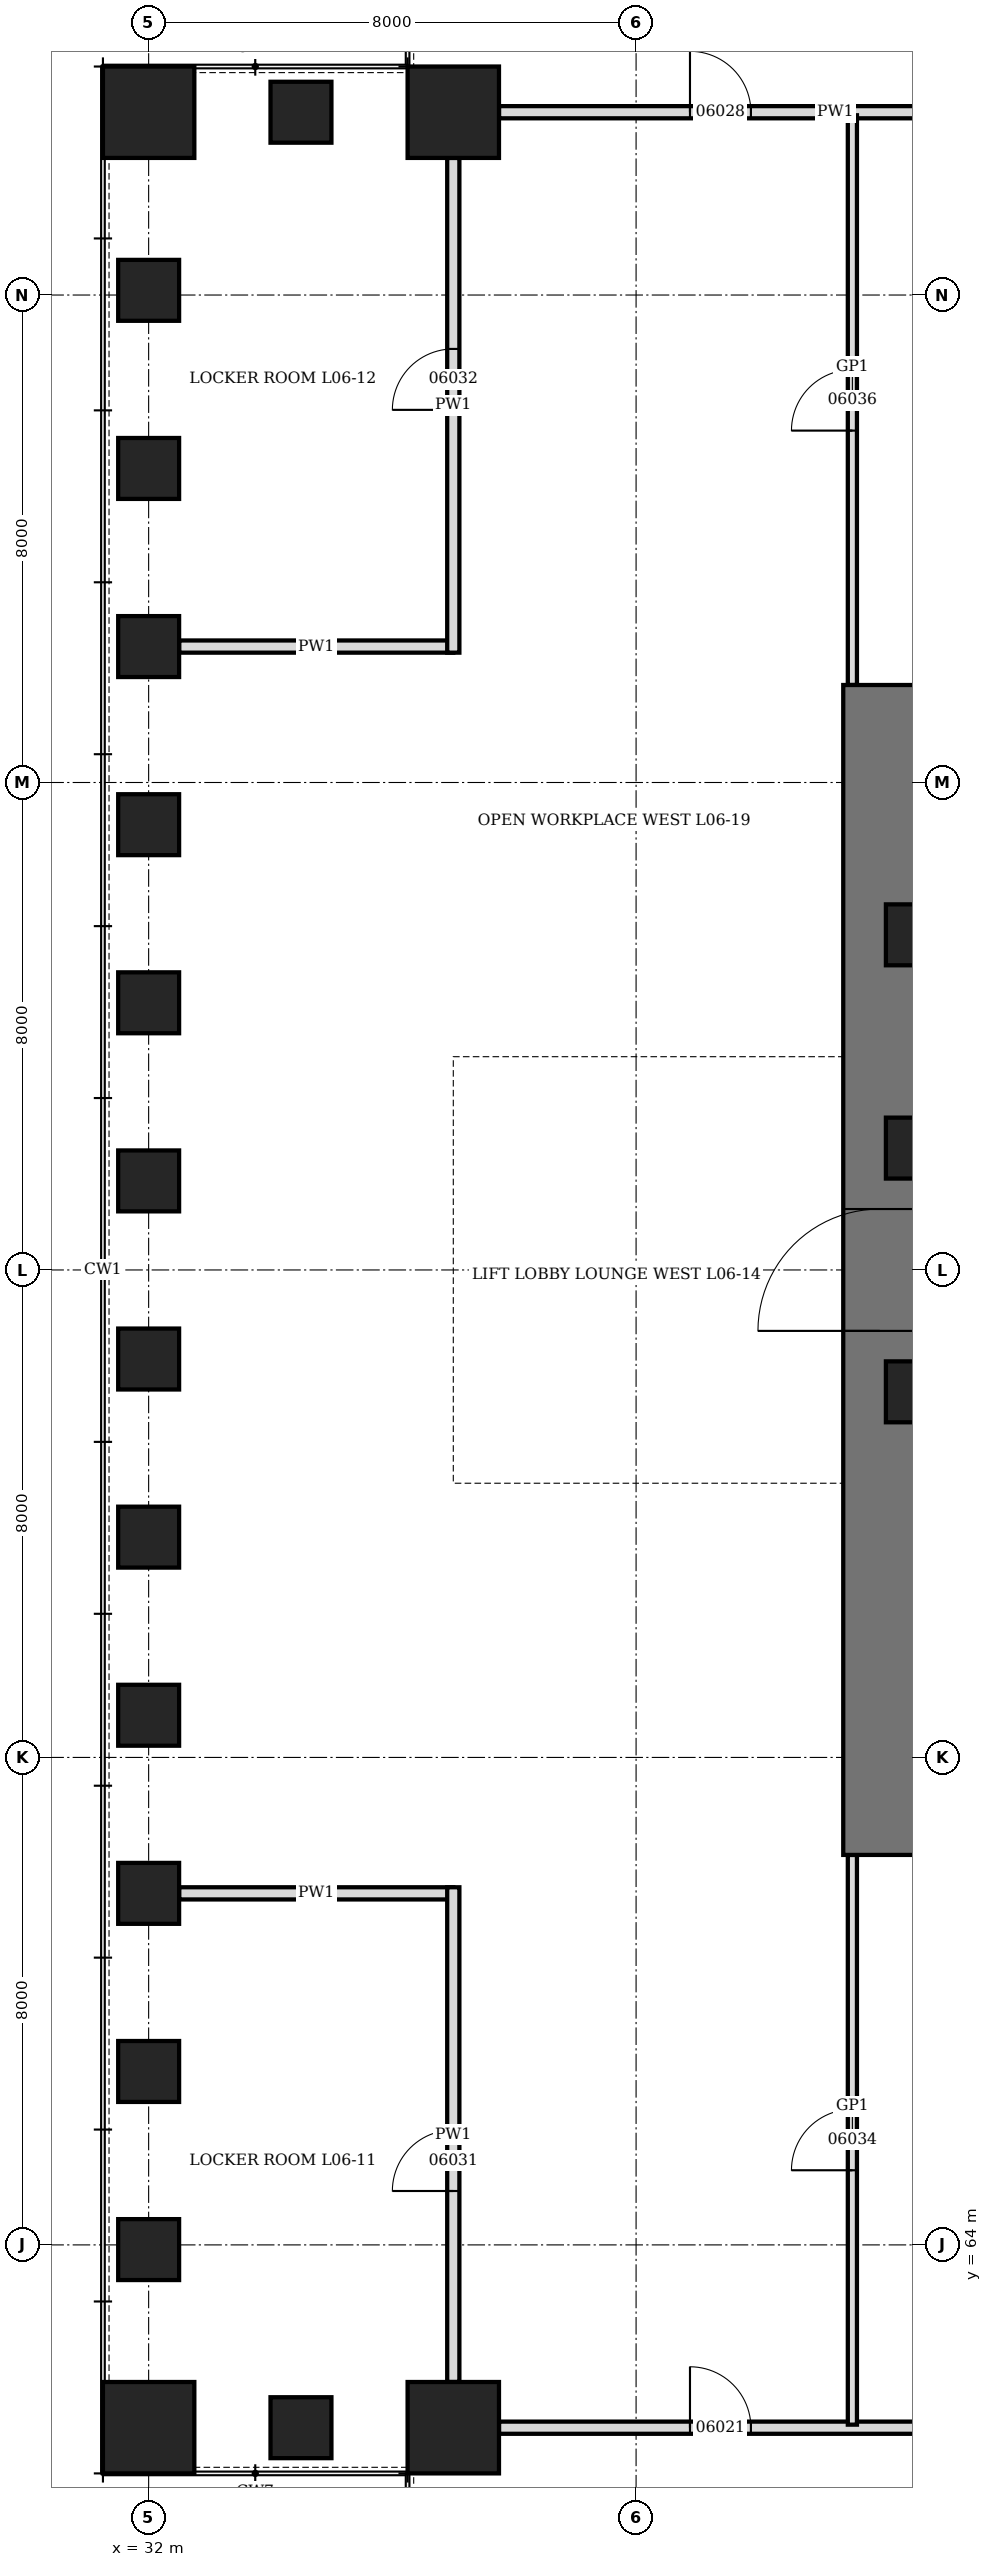
"""IFC4 building model, lengths in metres.
Left out: names, types, materials, properties, quantities, classifications, styles, units other than length and angle.
Written with IfcOpenShell. Run it as: python <this file> out.ifc"""

import sys

from ifc_helpers import new_model, si_unit, direction, frame, frame_2d, origin, origin_2d, place, context, subcontext, project, spatial, rectangle, hollow_rectangle, extrude, element, fill, save


model = new_model("IFC4")
c1 = context("Model", 3, precision=1e-05, world=origin(), true_north=direction((0.0, 1.0)))
c2 = subcontext(c1, "Body", "Model", "MODEL_VIEW")
j1 = project(units=[si_unit("LENGTHUNIT", "METRE"), si_unit("PLANEANGLEUNIT", "RADIAN")], contexts=[c1])
p1 = place(None, origin())
s1 = spatial("IfcSite", under=j1, at=p1, CompositionType="ELEMENT")
p2 = place(p1, origin())
s2 = spatial("IfcBuilding", under=s1, at=p2, CompositionType="ELEMENT")
p3 = place(p2, frame((0.0, 0.0, 34.9)))
s3 = spatial("IfcBuildingStorey", under=s2, at=p3, CompositionType="ELEMENT", Elevation=34.9)
p4 = place(p3, frame((37.0, 99.0, -0.3), z_axis=(0.0, 0.0, 1.0), x_axis=(1.0, 0.0, 0.0)))
e1 = element("IfcColumn", 1, at=p4, inside=s3, PredefinedType="COLUMN", context=c2, shape_type="SweptSolid", body=[
    extrude(hollow_rectangle(XDim=1.5, YDim=1.5, WallThickness=0.6, at=origin_2d()), origin(), (0.0, 0.0, 1.0), 4.5),
])
p5 = place(p3, frame((34.5, 99.0, -0.3), z_axis=(0.0, 0.0, 1.0), x_axis=(1.0, 0.0, 0.0)))
e2 = element("IfcColumn", 2, at=p5, inside=s3, PredefinedType="COLUMN", context=c2, shape_type="SweptSolid", body=[
    extrude(hollow_rectangle(XDim=1.0, YDim=1.0, WallThickness=0.25, at=origin_2d()), origin(), (0.0, 0.0, 1.0), 4.5),
])
p6 = place(p3, frame((32.0, 99.0, -0.3), z_axis=(0.0, 0.0, 1.0), x_axis=(0.0, 1.0, 0.0)))
e3 = element("IfcColumn", 3, at=p6, inside=s3, PredefinedType="COLUMN", context=c2, shape_type="SweptSolid", body=[
    extrude(hollow_rectangle(XDim=1.5, YDim=1.5, WallThickness=0.6, at=origin_2d()), origin(), (0.0, 0.0, 1.0), 4.5),
])
for number, where, z_axis, x_axis in (
    (4, (32.0, 96.077, -0.3), (0.0, 0.0, 1.0), (0.0, 1.0, 0.0)),
    (5, (32.0, 93.154, -0.3), (0.0, 0.0, 1.0), (0.0, 1.0, 0.0)),
    (6, (32.0, 90.231, -0.3), (0.0, 0.0, 1.0), (0.0, 1.0, 0.0)),
    (7, (32.0, 87.308, -0.3), (0.0, 0.0, 1.0), (0.0, 1.0, 0.0)),
    (8, (32.0, 84.385, -0.3), (0.0, 0.0, 1.0), (0.0, 1.0, 0.0)),
    (9, (32.0, 81.461, -0.3), (0.0, 0.0, 1.0), (0.0, 1.0, 0.0)),
    (10, (32.0, 78.539, -0.3), (0.0, 0.0, 1.0), (0.0, 1.0, 0.0)),
    (11, (32.0, 75.615, -0.3), (0.0, 0.0, 1.0), (0.0, 1.0, 0.0)),
    (12, (32.0, 72.692, -0.3), (0.0, 0.0, 1.0), (0.0, 1.0, 0.0)),
    (13, (32.0, 69.769, -0.3), (0.0, 0.0, 1.0), (0.0, 1.0, 0.0)),
    (14, (32.0, 66.846, -0.3), (0.0, 0.0, 1.0), (0.0, 1.0, 0.0)),
    (15, (32.0, 63.923, -0.3), (0.0, 0.0, 1.0), (0.0, 1.0, 0.0)),
):
    element("IfcColumn", number, at=place(p3, frame(where, z_axis=z_axis, x_axis=x_axis)), inside=s3, PredefinedType="COLUMN", context=c2, shape_type="SweptSolid", body=[
        extrude(hollow_rectangle(XDim=1.0, YDim=1.0, WallThickness=0.25, at=origin_2d()), origin(), (0.0, 0.0, 1.0), 4.5),
    ])
p7 = place(p3, frame((32.0, 61.0, -0.3), z_axis=(0.0, 0.0, 1.0), x_axis=(1.0, 0.0, 0.0)))
e16 = element("IfcColumn", 16, at=p7, inside=s3, PredefinedType="COLUMN", context=c2, shape_type="SweptSolid", body=[
    extrude(hollow_rectangle(XDim=1.5, YDim=1.5, WallThickness=0.6, at=origin_2d()), origin(), (0.0, 0.0, 1.0), 4.5),
])
p8 = place(p3, frame((34.5, 61.0, -0.3), z_axis=(0.0, 0.0, 1.0), x_axis=(1.0, 0.0, 0.0)))
e17 = element("IfcColumn", 17, at=p8, inside=s3, PredefinedType="COLUMN", context=c2, shape_type="SweptSolid", body=[
    extrude(hollow_rectangle(XDim=1.0, YDim=1.0, WallThickness=0.25, at=origin_2d()), origin(), (0.0, 0.0, 1.0), 4.5),
])
p9 = place(p3, frame((37.0, 61.0, -0.3), z_axis=(0.0, 0.0, 1.0), x_axis=(0.0, 1.0, 0.0)))
e18 = element("IfcColumn", 18, at=p9, inside=s3, PredefinedType="COLUMN", context=c2, shape_type="SweptSolid", body=[
    extrude(hollow_rectangle(XDim=1.5, YDim=1.5, WallThickness=0.6, at=origin_2d()), origin(), (0.0, 0.0, 1.0), 4.5),
])
p10 = place(p3, frame((44.0, 70.4, 0.0), z_axis=(0.0, 0.0, 1.0), x_axis=(0.0, 1.0, 0.0)))
e19 = element("IfcWall", 19, at=p10, inside=s3, PredefinedType="SHEAR", context=c2, shape_type="SweptSolid", body=[
    extrude(rectangle(XDim=19.2, YDim=1.2, at=frame_2d((9.6, 0.0))), origin(), (0.0, 0.0, 1.0), 4.2),
])
p11 = place(p10, frame((8.6, 0.0, 0.0)))
e20 = element("IfcOpeningElement", 20, at=p11, cuts=e19, PredefinedType="OPENING", context=c2, shape_type="SweptSolid", body=[
    extrude(rectangle(XDim=2.0, YDim=2.4, at=frame_2d((1.0, 1.2))), frame((0.0, 0.61, 0.0), z_axis=(0.0, -1.0, 0.0), x_axis=(1.0, 0.0, 0.0)), (0.0, 0.0, 1.0), 1.22),
])
for number, where, z_axis, x_axis in (
    (21, (44.6, 78.0, 0.0), (0.0, 0.0, 1.0), (1.0, 0.0, 0.0)),
    (22, (44.6, 82.0, 0.0), (0.0, 0.0, 1.0), (1.0, 0.0, 0.0)),
    (23, (44.6, 85.5, 0.0), (0.0, 0.0, 1.0), (1.0, 0.0, 0.0)),
):
    element("IfcColumn", number, at=place(p3, frame(where, z_axis=z_axis, x_axis=x_axis)), inside=s3, PredefinedType="COLUMN", context=c2, shape_type="SweptSolid", body=[
        extrude(hollow_rectangle(XDim=1.0, YDim=1.0, WallThickness=0.15, at=origin_2d()), origin(), (0.0, 0.0, 1.0), 4.2),
    ])
for number, where, z_axis, x_axis in (
    (24, (32.5, 69.769, 0.0), (0.0, 0.0, 1.0), (1.0, 0.0, 0.0)),
    (25, (32.5, 90.231, 0.0), (0.0, 0.0, 1.0), (1.0, 0.0, 0.0)),
):
    element("IfcWall", number, at=place(p3, frame(where, z_axis=z_axis, x_axis=x_axis)), inside=s3, PredefinedType="PARTITIONING", context=c2, shape_type="SweptSolid", body=[
        extrude(rectangle(XDim=4.5, YDim=0.2, at=frame_2d((2.25, 0.0))), origin(), (0.0, 0.0, 1.0), 3.428),
    ])
p12 = place(p3, frame((37.75, 61.0, 0.0), z_axis=(0.0, 0.0, 1.0), x_axis=(1.0, 0.0, 0.0)))
e26 = element("IfcWall", 26, at=p12, inside=s3, PredefinedType="PARTITIONING", context=c2, shape_type="SweptSolid", body=[
    extrude(rectangle(XDim=16.888, YDim=0.2, at=frame_2d((8.444, 0.0))), origin(), (0.0, 0.0, 1.0), 4.04),
])
p13 = place(p12, frame((3.135, 0.0, 0.0)))
e27 = element("IfcOpeningElement", 27, at=p13, cuts=e26, PredefinedType="OPENING", context=c2, shape_type="SweptSolid", body=[
    extrude(rectangle(XDim=1.0, YDim=2.1, at=frame_2d((0.5, 1.05))), frame((0.0, 0.11, 0.0), z_axis=(0.0, -1.0, 0.0), x_axis=(1.0, 0.0, 0.0)), (0.0, 0.0, 1.0), 0.22),
])
p14 = place(p12, frame((11.904, 0.0, 0.0)))
e28 = element("IfcOpeningElement", 28, at=p14, cuts=e26, PredefinedType="OPENING", context=c2, shape_type="SweptSolid", body=[
    extrude(rectangle(XDim=1.0, YDim=2.1, at=frame_2d((0.5, 1.05))), frame((0.0, 0.11, 0.0), z_axis=(0.0, -1.0, 0.0), x_axis=(1.0, 0.0, 0.0)), (0.0, 0.0, 1.0), 0.22),
])
p15 = place(p3, frame((37.75, 99.0, 0.0), z_axis=(0.0, 0.0, 1.0), x_axis=(1.0, 0.0, 0.0)))
e29 = element("IfcWall", 29, at=p15, inside=s3, PredefinedType="PARTITIONING", context=c2, shape_type="SweptSolid", body=[
    extrude(rectangle(XDim=11.042, YDim=0.2, at=frame_2d((5.521, 0.0))), origin(), (0.0, 0.0, 1.0), 4.04),
])
p16 = place(p15, frame((3.135, 0.0, 0.0)))
e30 = element("IfcOpeningElement", 30, at=p16, cuts=e29, PredefinedType="OPENING", context=c2, shape_type="SweptSolid", body=[
    extrude(rectangle(XDim=1.0, YDim=2.1, at=frame_2d((0.5, 1.05))), frame((0.0, 0.11, 0.0), z_axis=(0.0, -1.0, 0.0), x_axis=(1.0, 0.0, 0.0)), (0.0, 0.0, 1.0), 0.22),
])
p17 = place(p3, frame((37.0, 61.75, 0.0), z_axis=(0.0, 0.0, 1.0), x_axis=(0.0, 1.0, 0.0)))
e31 = element("IfcWall", 31, at=p17, inside=s3, PredefinedType="PARTITIONING", context=c2, shape_type="SweptSolid", body=[
    extrude(rectangle(XDim=8.119, YDim=0.2, at=frame_2d((4.06, 0.0))), origin(), (0.0, 0.0, 1.0), 4.04),
])
p18 = place(p17, frame((3.135, 0.0, 0.0)))
e32 = element("IfcOpeningElement", 32, at=p18, cuts=e31, PredefinedType="OPENING", context=c2, shape_type="SweptSolid", body=[
    extrude(rectangle(XDim=1.0, YDim=2.1, at=frame_2d((0.5, 1.05))), frame((0.0, 0.11, 0.0), z_axis=(0.0, -1.0, 0.0), x_axis=(1.0, 0.0, 0.0)), (0.0, 0.0, 1.0), 0.22),
])
p19 = place(p3, frame((37.0, 90.131, 0.0), z_axis=(0.0, 0.0, 1.0), x_axis=(0.0, 1.0, 0.0)))
e33 = element("IfcWall", 33, at=p19, inside=s3, PredefinedType="PARTITIONING", context=c2, shape_type="SweptSolid", body=[
    extrude(rectangle(XDim=8.119, YDim=0.2, at=frame_2d((4.06, 0.0))), origin(), (0.0, 0.0, 1.0), 4.04),
])
p20 = place(p19, frame((3.985, 0.0, 0.0)))
e34 = element("IfcOpeningElement", 34, at=p20, cuts=e33, PredefinedType="OPENING", context=c2, shape_type="SweptSolid", body=[
    extrude(rectangle(XDim=1.0, YDim=2.1, at=frame_2d((0.5, 1.05))), frame((0.0, 0.11, 0.0), z_axis=(0.0, -1.0, 0.0), x_axis=(1.0, 0.0, 0.0)), (0.0, 0.0, 1.0), 0.22),
])
p21 = place(p3, frame((43.55, 61.05, 0.0), z_axis=(0.0, 0.0, 1.0), x_axis=(0.0, 1.0, 0.0)))
e35 = element("IfcWall", 35, at=p21, inside=s3, PredefinedType="PARTITIONING", context=c2, shape_type="SweptSolid", body=[
    extrude(rectangle(XDim=9.35, YDim=0.15, at=frame_2d((4.675, 0.0))), origin(), (0.0, 0.0, 1.0), 4.04),
])
p22 = place(p21, frame((4.175, 0.0, 0.0)))
e36 = element("IfcOpeningElement", 36, at=p22, cuts=e35, PredefinedType="OPENING", context=c2, shape_type="SweptSolid", body=[
    extrude(rectangle(XDim=1.0, YDim=2.4, at=frame_2d((0.5, 1.2))), frame((0.0, 0.085, 0.0), z_axis=(0.0, -1.0, 0.0), x_axis=(1.0, 0.0, 0.0)), (0.0, 0.0, 1.0), 0.17),
])
p23 = place(p3, frame((43.55, 89.6, 0.0), z_axis=(0.0, 0.0, 1.0), x_axis=(0.0, 1.0, 0.0)))
e37 = element("IfcWall", 37, at=p23, inside=s3, PredefinedType="PARTITIONING", context=c2, shape_type="SweptSolid", body=[
    extrude(rectangle(XDim=9.35, YDim=0.15, at=frame_2d((4.675, 0.0))), origin(), (0.0, 0.0, 1.0), 4.04),
])
p24 = place(p23, frame((4.175, 0.0, 0.0)))
e38 = element("IfcOpeningElement", 38, at=p24, cuts=e37, PredefinedType="OPENING", context=c2, shape_type="SweptSolid", body=[
    extrude(rectangle(XDim=1.0, YDim=2.4, at=frame_2d((0.5, 1.2))), frame((0.0, 0.085, 0.0), z_axis=(0.0, -1.0, 0.0), x_axis=(1.0, 0.0, 0.0)), (0.0, 0.0, 1.0), 0.17),
])
p25 = place(p11, origin())
e39 = element("IfcDoor", 39, at=p25, inside=s3, OperationType="DOUBLE_DOOR_SINGLE_SWING", PredefinedType="DOOR", context=c2, shape_type="SweptSolid", body=[
    extrude(rectangle(XDim=2.0, YDim=2.4, at=frame_2d((1.0, 1.2))), frame((0.0, 0.35, 0.0), z_axis=(0.0, -1.0, 0.0), x_axis=(1.0, 0.0, 0.0)), (0.0, 0.0, 1.0), 0.7),
])
fill(e20, e39)
p26 = place(p13, origin())
e40 = element("IfcDoor", 40, at=p26, inside=s3, OperationType="SINGLE_SWING_LEFT", PredefinedType="DOOR", context=c2, shape_type="SweptSolid", body=[
    extrude(rectangle(XDim=1.0, YDim=2.1, at=frame_2d((0.5, 1.05))), frame((0.0, 0.1, 0.0), z_axis=(0.0, -1.0, 0.0), x_axis=(1.0, 0.0, 0.0)), (0.0, 0.0, 1.0), 0.199),
])
fill(e27, e40)
p27 = place(p16, origin())
e41 = element("IfcDoor", 41, at=p27, inside=s3, OperationType="SINGLE_SWING_LEFT", PredefinedType="DOOR", context=c2, shape_type="SweptSolid", body=[
    extrude(rectangle(XDim=1.0, YDim=2.1, at=frame_2d((0.5, 1.05))), frame((0.0, 0.1, 0.0), z_axis=(0.0, -1.0, 0.0), x_axis=(1.0, 0.0, 0.0)), (0.0, 0.0, 1.0), 0.199),
])
fill(e30, e41)
p28 = place(p18, origin())
e42 = element("IfcDoor", 42, at=p28, inside=s3, OperationType="SINGLE_SWING_LEFT", PredefinedType="DOOR", context=c2, shape_type="SweptSolid", body=[
    extrude(rectangle(XDim=1.0, YDim=2.1, at=frame_2d((0.5, 1.05))), frame((0.0, 0.1, 0.0), z_axis=(0.0, -1.0, 0.0), x_axis=(1.0, 0.0, 0.0)), (0.0, 0.0, 1.0), 0.199),
])
fill(e32, e42)
p29 = place(p20, origin())
e43 = element("IfcDoor", 43, at=p29, inside=s3, OperationType="SINGLE_SWING_LEFT", PredefinedType="DOOR", context=c2, shape_type="SweptSolid", body=[
    extrude(rectangle(XDim=1.0, YDim=2.1, at=frame_2d((0.5, 1.05))), frame((0.0, 0.1, 0.0), z_axis=(0.0, -1.0, 0.0), x_axis=(1.0, 0.0, 0.0)), (0.0, 0.0, 1.0), 0.199),
])
fill(e34, e43)
p30 = place(p22, origin())
e44 = element("IfcDoor", 44, at=p30, inside=s3, OperationType="SINGLE_SWING_RIGHT", PredefinedType="DOOR", context=c2, shape_type="SweptSolid", body=[
    extrude(rectangle(XDim=1.0, YDim=2.4, at=frame_2d((0.5, 1.2))), frame((0.0, 0.075, 0.0), z_axis=(0.0, -1.0, 0.0), x_axis=(1.0, 0.0, 0.0)), (0.0, 0.0, 1.0), 0.149),
])
fill(e36, e44)
p31 = place(p24, origin())
e45 = element("IfcDoor", 45, at=p31, inside=s3, OperationType="SINGLE_SWING_RIGHT", PredefinedType="DOOR", context=c2, shape_type="SweptSolid", body=[
    extrude(rectangle(XDim=1.0, YDim=2.4, at=frame_2d((0.5, 1.2))), frame((0.0, 0.075, 0.0), z_axis=(0.0, -1.0, 0.0), x_axis=(1.0, 0.0, 0.0)), (0.0, 0.0, 1.0), 0.149),
])
fill(e38, e45)
save(model, sys.argv[1])
